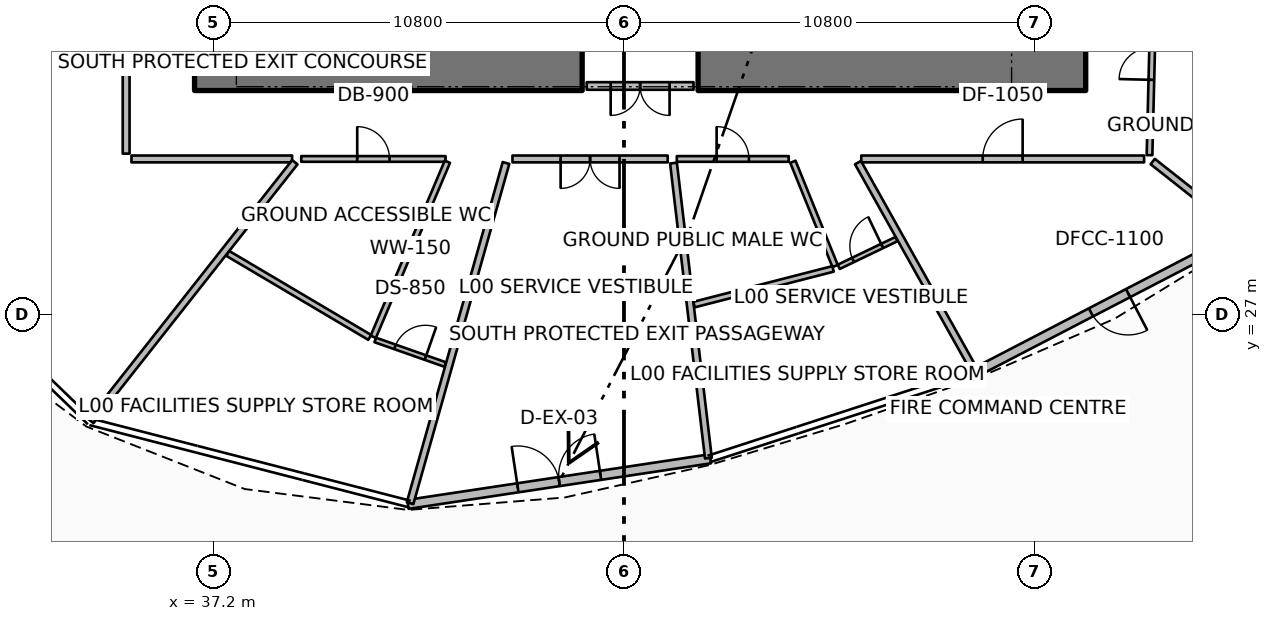
"""IFC4 building model, lengths in metres.
Left out: names, types, materials, properties, quantities, classifications, styles, units other than length and angle.
Written with IfcOpenShell. Run it as: python <this file> out.ifc"""

import sys

from ifc_helpers import new_model, si_unit, direction, frame, frame_2d, origin, place, context, subcontext, project, spatial, rectangle, extrude, element, fill, save


model = new_model("IFC4")
c1 = context("Model", 3, precision=1e-05, world=origin(), true_north=direction((0.0, 1.0)))
c2 = subcontext(c1, "Body", "Model", "MODEL_VIEW")
j1 = project(units=[si_unit("LENGTHUNIT", "METRE"), si_unit("PLANEANGLEUNIT", "RADIAN")], contexts=[c1])
p1 = place(None, origin())
s1 = spatial("IfcSite", under=j1, at=p1, CompositionType="ELEMENT")
p2 = place(p1, origin())
s2 = spatial("IfcBuilding", under=s1, at=p2, CompositionType="ELEMENT")
p3 = place(p2, origin())
s3 = spatial("IfcBuildingStorey", under=s2, at=p3, CompositionType="ELEMENT", Elevation=0.0)
for number, where, z_axis, x_axis in (
    (1, (36.7, 33.45, 0.0), (0.0, 0.0, 1.0), (1.0, 0.0, 0.0)),
    (2, (49.95, 33.45, 0.0), (0.0, 0.0, 1.0), (1.0, 0.0, 0.0)),
):
    element("IfcWall", number, at=place(p3, frame(where, z_axis=z_axis, x_axis=x_axis)), inside=s3, PredefinedType="SHEAR", context=c2, shape_type="SweptSolid", body=[
        extrude(rectangle(XDim=10.2, YDim=1.1, at=frame_2d((5.1, 0.0))), origin(), (0.0, 0.0, 1.0), 7.2),
    ])
p4 = place(p3, frame((50.274, 23.21, 0.0), z_axis=(0.0, 0.0, 1.0), x_axis=(-0.988842711484, -0.148963391291, 0.0)))
e3 = element("IfcWall", 3, at=p4, inside=s3, PredefinedType="SOLIDWALL", context=c2, shape_type="SweptSolid", body=[
    extrude(rectangle(XDim=8.049, YDim=0.24, at=frame_2d((4.024, 0.0))), origin(), (0.0, 0.0, 1.0), 5.35),
])
p5 = place(p4, frame((2.924, 0.0, 0.0)))
e4 = element("IfcOpeningElement", 4, at=p5, cuts=e3, PredefinedType="OPENING", context=c2, shape_type="SweptSolid", body=[
    extrude(rectangle(XDim=2.2, YDim=2.4, at=frame_2d((1.1, 1.2))), frame((0.0, 0.13, 0.0), z_axis=(0.0, -1.0, 0.0), x_axis=(1.0, 0.0, 0.0)), (0.0, 0.0, 1.0), 0.26),
])
p6 = place(p3, frame((64.348, 29.17, 0.0), z_axis=(0.0, 0.0, 1.0), x_axis=(-0.887579557391, -0.460654457594, 0.0)))
e5 = element("IfcWall", 5, at=p6, inside=s3, PredefinedType="SOLIDWALL", context=c2, shape_type="SweptSolid", body=[
    extrude(rectangle(XDim=8.049, YDim=0.24, at=frame_2d((4.024, 0.0))), origin(), (0.0, 0.0, 1.0), 5.35),
])
p7 = place(p6, frame((3.474, 0.0, 0.0)))
e6 = element("IfcOpeningElement", 6, at=p7, cuts=e5, PredefinedType="OPENING", context=c2, shape_type="SweptSolid", body=[
    extrude(rectangle(XDim=1.1, YDim=2.2, at=frame_2d((0.55, 1.1))), frame((0.0, 0.13, 0.0), z_axis=(0.0, -1.0, 0.0), x_axis=(1.0, 0.0, 0.0)), (0.0, 0.0, 1.0), 0.26),
])
p8 = place(p3, frame((47.02, 33.02, 0.0), z_axis=(0.0, 0.0, 1.0), x_axis=(1.0, 0.0, 0.0)))
e7 = element("IfcWall", 7, at=p8, inside=s3, PredefinedType="PARTITIONING", context=c2, shape_type="SweptSolid", body=[
    extrude(rectangle(XDim=2.81, YDim=0.2, at=frame_2d((1.405, 0.0))), origin(), (0.0, 0.0, 1.0), 6.8),
])
p9 = place(p8, frame((0.63, 0.0, 0.0)))
e8 = element("IfcOpeningElement", 8, at=p9, cuts=e7, PredefinedType="OPENING", context=c2, shape_type="SweptSolid", body=[
    extrude(rectangle(XDim=1.55, YDim=2.15, at=frame_2d((0.775, 1.075))), frame((0.0, 0.11, 0.0), z_axis=(0.0, -1.0, 0.0), x_axis=(1.0, 0.0, 0.0)), (0.0, 0.0, 1.0), 0.22),
])
p10 = place(p3, frame((34.9, 34.524, 0.0), z_axis=(0.0, 0.0, 1.0), x_axis=(0.0, -1.0, 0.0)))
e9 = element("IfcWall", 9, at=p10, inside=s3, PredefinedType="PARTITIONING", context=c2, shape_type="SweptSolid", body=[
    extrude(rectangle(XDim=3.284, YDim=0.18, at=frame_2d((1.642, 0.0))), origin(), (0.0, 0.0, 1.0), 5.375),
])
p11 = place(p3, frame((35.04, 31.1, 0.0), z_axis=(0.0, 0.0, 1.0), x_axis=(1.0, 0.0, 0.0)))
e10 = element("IfcWall", 10, at=p11, inside=s3, PredefinedType="PARTITIONING", context=c2, shape_type="SweptSolid", body=[
    extrude(rectangle(XDim=4.227, YDim=0.18, at=frame_2d((2.114, 0.0))), origin(), (0.0, 0.0, 1.0), 5.375),
])
p12 = place(p3, frame((39.339, 31.014, 0.0), z_axis=(0.0, 0.0, 1.0), x_axis=(-0.619079077481, -0.785328654657, 0.0)))
e11 = element("IfcWall", 11, at=p12, inside=s3, PredefinedType="PARTITIONING", context=c2, shape_type="SweptSolid", body=[
    extrude(rectangle(XDim=8.672, YDim=0.18, at=frame_2d((4.336, 0.0))), origin(), (0.0, 0.0, 1.0), 5.375),
])
p13 = place(p3, frame((39.507, 31.1, 0.0), z_axis=(0.0, 0.0, 1.0), x_axis=(1.0, 0.0, 0.0)))
e12 = element("IfcWall", 12, at=p13, inside=s3, PredefinedType="PARTITIONING", context=c2, shape_type="SweptSolid", body=[
    extrude(rectangle(XDim=3.797, YDim=0.15, at=frame_2d((1.899, 0.0))), origin(), (0.0, 0.0, 1.0), 5.375),
])
p14 = place(p13, frame((1.474, 0.0, 0.0)))
e13 = element("IfcOpeningElement", 13, at=p14, cuts=e12, PredefinedType="OPENING", context=c2, shape_type="SweptSolid", body=[
    extrude(rectangle(XDim=0.85, YDim=2.06, at=frame_2d((0.425, 1.03))), frame((0.0, 0.085, 0.0), z_axis=(0.0, -1.0, 0.0), x_axis=(1.0, 0.0, 0.0)), (0.0, 0.0, 1.0), 0.17),
])
p15 = place(p3, frame((43.353, 31.026, 0.0), z_axis=(0.0, 0.0, 1.0), x_axis=(-0.389934465456, -0.92084261014, 0.0)))
e14 = element("IfcWall", 14, at=p15, inside=s3, PredefinedType="PARTITIONING", context=c2, shape_type="SweptSolid", body=[
    extrude(rectangle(XDim=5.003, YDim=0.15, at=frame_2d((2.501, 0.0))), origin(), (0.0, 0.0, 1.0), 6.24),
])
p16 = place(p3, frame((37.574, 28.615, 0.0), z_axis=(0.0, 0.0, 1.0), x_axis=(0.860721546392, -0.509076044984, 0.0)))
e15 = element("IfcWall", 15, at=p16, inside=s3, PredefinedType="PARTITIONING", context=c2, shape_type="SweptSolid", body=[
    extrude(rectangle(XDim=4.341, YDim=0.15, at=frame_2d((2.17, 0.0))), origin(), (0.0, 0.0, 1.0), 5.375),
])
p17 = place(p3, frame((41.455, 26.337, 0.0), z_axis=(0.0, 0.0, 1.0), x_axis=(0.943522494941, -0.331308468863, 0.0)))
e16 = element("IfcWall", 16, at=p17, inside=s3, PredefinedType="PARTITIONING", context=c2, shape_type="SweptSolid", body=[
    extrude(rectangle(XDim=1.952, YDim=0.125, at=frame_2d((0.976, 0.0))), origin(), (0.0, 0.0, 1.0), 5.375),
])
p18 = place(p17, frame((0.551, 0.0, 0.0)))
e17 = element("IfcOpeningElement", 17, at=p18, cuts=e16, PredefinedType="OPENING", context=c2, shape_type="SweptSolid", body=[
    extrude(rectangle(XDim=0.85, YDim=2.06, at=frame_2d((0.425, 1.03))), frame((0.0, 0.073, 0.0), z_axis=(0.0, -1.0, 0.0), x_axis=(1.0, 0.0, 0.0)), (0.0, 0.0, 1.0), 0.145),
])
p19 = place(p3, frame((44.896, 30.994, 0.0), z_axis=(0.0, 0.0, 1.0), x_axis=(-0.271432731122, -0.962457413331, 0.0)))
e18 = element("IfcWall", 18, at=p19, inside=s3, PredefinedType="PARTITIONING", context=c2, shape_type="SweptSolid", body=[
    extrude(rectangle(XDim=9.3, YDim=0.18, at=frame_2d((4.65, 0.0))), origin(), (0.0, 0.0, 1.0), 5.375),
])
p20 = place(p3, frame((45.066, 31.1, 0.0), z_axis=(0.0, 0.0, 1.0), x_axis=(1.0, 0.0, 0.0)))
e19 = element("IfcWall", 19, at=p20, inside=s3, PredefinedType="PARTITIONING", context=c2, shape_type="SweptSolid", body=[
    extrude(rectangle(XDim=4.084, YDim=0.18, at=frame_2d((2.042, 0.0))), origin(), (0.0, 0.0, 1.0), 5.375),
])
p21 = place(p20, frame((1.267, 0.0, 0.0)))
e20 = element("IfcOpeningElement", 20, at=p21, cuts=e19, PredefinedType="OPENING", context=c2, shape_type="SweptSolid", body=[
    extrude(rectangle(XDim=1.55, YDim=2.15, at=frame_2d((0.775, 1.075))), frame((0.0, 0.1, 0.0), z_axis=(0.0, -1.0, 0.0), x_axis=(1.0, 0.0, 0.0)), (0.0, 0.0, 1.0), 0.2),
])
p22 = place(p3, frame((49.303, 30.991, 0.0), z_axis=(0.0, 0.0, 1.0), x_axis=(0.117524370387, -0.993069998724, 0.0)))
e21 = element("IfcWall", 21, at=p22, inside=s3, PredefinedType="PARTITIONING", context=c2, shape_type="SweptSolid", body=[
    extrude(rectangle(XDim=7.817, YDim=0.18, at=frame_2d((3.909, 0.0))), origin(), (0.0, 0.0, 1.0), 6.24),
])
p23 = place(p3, frame((49.39, 31.1, 0.0), z_axis=(0.0, 0.0, 1.0), x_axis=(1.0, 0.0, 0.0)))
e22 = element("IfcWall", 22, at=p23, inside=s3, PredefinedType="PARTITIONING", context=c2, shape_type="SweptSolid", body=[
    extrude(rectangle(XDim=2.945, YDim=0.15, at=frame_2d((1.472, 0.0))), origin(), (0.0, 0.0, 1.0), 5.757),
])
p24 = place(p23, frame((1.048, 0.0, 0.0)))
e23 = element("IfcOpeningElement", 23, at=p24, cuts=e22, PredefinedType="OPENING", context=c2, shape_type="SweptSolid", body=[
    extrude(rectangle(XDim=0.85, YDim=2.06, at=frame_2d((0.425, 1.03))), frame((0.0, 0.085, 0.0), z_axis=(0.0, -1.0, 0.0), x_axis=(1.0, 0.0, 0.0)), (0.0, 0.0, 1.0), 0.17),
])
p25 = place(p3, frame((52.445, 31.026, 0.0), z_axis=(0.0, 0.0, 1.0), x_axis=(0.375383430631, -0.926869613272, 0.0)))
e24 = element("IfcWall", 24, at=p25, inside=s3, PredefinedType="PARTITIONING", context=c2, shape_type="SweptSolid", body=[
    extrude(rectangle(XDim=2.96, YDim=0.15, at=frame_2d((1.48, 0.0))), origin(), (0.0, 0.0, 1.0), 6.24),
])
p26 = place(p3, frame((49.844, 27.268, 0.0), z_axis=(0.0, 0.0, 1.0), x_axis=(0.968578859701, 0.248706639519, 0.0)))
e25 = element("IfcWall", 25, at=p26, inside=s3, PredefinedType="PARTITIONING", context=c2, shape_type="SweptSolid", body=[
    extrude(rectangle(XDim=3.776, YDim=0.15, at=frame_2d((1.888, 0.0))), origin(), (0.0, 0.0, 1.0), 5.757),
])
p27 = place(p3, frame((53.651, 28.261, 0.0), z_axis=(0.0, 0.0, 1.0), x_axis=(0.90143718487, 0.432909923348, 0.0)))
e26 = element("IfcWall", 26, at=p27, inside=s3, PredefinedType="PARTITIONING", context=c2, shape_type="SweptSolid", body=[
    extrude(rectangle(XDim=1.686, YDim=0.125, at=frame_2d((0.843, 0.0))), origin(), (0.0, 0.0, 1.0), 5.757),
])
p28 = place(p27, frame((0.418, 0.0, 0.0)))
e27 = element("IfcOpeningElement", 27, at=p28, cuts=e26, PredefinedType="OPENING", context=c2, shape_type="SweptSolid", body=[
    extrude(rectangle(XDim=0.85, YDim=2.06, at=frame_2d((0.425, 1.03))), frame((0.0, 0.073, 0.0), z_axis=(0.0, -1.0, 0.0), x_axis=(1.0, 0.0, 0.0)), (0.0, 0.0, 1.0), 0.145),
])
p29 = place(p3, frame((54.158, 31.004, 0.0), z_axis=(0.0, 0.0, 1.0), x_axis=(0.488621069092, -0.872496103624, 0.0)))
e28 = element("IfcWall", 28, at=p29, inside=s3, PredefinedType="PARTITIONING", context=c2, shape_type="SweptSolid", body=[
    extrude(rectangle(XDim=6.3, YDim=0.18, at=frame_2d((3.15, 0.0))), origin(), (0.0, 0.0, 1.0), 5.757),
])
p30 = place(p3, frame((54.244, 31.1, 0.0), z_axis=(0.0, 0.0, 1.0), x_axis=(1.0, 0.0, 0.0)))
e29 = element("IfcWall", 29, at=p30, inside=s3, PredefinedType="PARTITIONING", context=c2, shape_type="SweptSolid", body=[
    extrude(rectangle(XDim=7.442, YDim=0.18, at=frame_2d((3.721, 0.0))), origin(), (0.0, 0.0, 1.0), 5.757),
])
p31 = place(p30, frame((3.196, 0.0, 0.0)))
e30 = element("IfcOpeningElement", 30, at=p31, cuts=e29, PredefinedType="OPENING", context=c2, shape_type="SweptSolid", body=[
    extrude(rectangle(XDim=1.05, YDim=2.1, at=frame_2d((0.525, 1.05))), frame((0.0, 0.1, 0.0), z_axis=(0.0, -1.0, 0.0), x_axis=(1.0, 0.0, 0.0)), (0.0, 0.0, 1.0), 0.2),
])
p32 = place(p3, frame((61.913, 31.032, 0.0), z_axis=(0.0, 0.0, 1.0), x_axis=(0.785290333853, -0.619127685988, 0.0)))
e31 = element("IfcWall", 31, at=p32, inside=s3, PredefinedType="PARTITIONING", context=c2, shape_type="SweptSolid", body=[
    extrude(rectangle(XDim=3.019, YDim=0.18, at=frame_2d((1.51, 0.0))), origin(), (0.0, 0.0, 1.0), 5.757),
])
p33 = place(p3, frame((61.829, 31.2, 0.0), z_axis=(0.0, 0.0, 1.0), x_axis=(0.024695722425, 0.999695014139, 0.0)))
e32 = element("IfcWall", 32, at=p33, inside=s3, PredefinedType="PARTITIONING", context=c2, shape_type="SweptSolid", body=[
    extrude(rectangle(XDim=4.814, YDim=0.15, at=frame_2d((2.407, 0.0))), origin(), (0.0, 0.0, 1.0), 5.757),
])
p34 = place(p33, frame((1.982, 0.0, 0.0)))
e33 = element("IfcOpeningElement", 33, at=p34, cuts=e32, PredefinedType="OPENING", context=c2, shape_type="SweptSolid", body=[
    extrude(rectangle(XDim=0.85, YDim=2.06, at=frame_2d((0.425, 1.03))), frame((0.0, 0.085, 0.0), z_axis=(0.0, -1.0, 0.0), x_axis=(1.0, 0.0, 0.0)), (0.0, 0.0, 1.0), 0.17),
])
p35 = place(p3, frame((62.024, 36.062, 0.0), z_axis=(0.0, 0.0, 1.0), x_axis=(0.920852129173, -0.389911985193, 0.0)))
e34 = element("IfcWall", 34, at=p35, inside=s3, PredefinedType="PARTITIONING", context=c2, shape_type="SweptSolid", body=[
    extrude(rectangle(XDim=5.417, YDim=0.15, at=frame_2d((2.708, 0.0))), origin(), (0.0, 0.0, 1.0), 6.24),
])
p36 = place(p5, origin())
e35 = element("IfcDoor", 35, at=p36, inside=s3, OperationType="DOUBLE_DOOR_SINGLE_SWING", PredefinedType="DOOR", context=c2, shape_type="SweptSolid", body=[
    extrude(rectangle(XDim=2.2, YDim=2.4, at=frame_2d((1.1, 1.2))), frame((0.0, 0.025, 0.0), z_axis=(0.0, -1.0, 0.0), x_axis=(1.0, 0.0, 0.0)), (0.0, 0.0, 1.0), 0.05),
])
fill(e4, e35)
p37 = place(p7, origin())
e36 = element("IfcDoor", 36, at=p37, inside=s3, OperationType="SINGLE_SWING_LEFT", PredefinedType="DOOR", context=c2, shape_type="SweptSolid", body=[
    extrude(rectangle(XDim=1.1, YDim=2.2, at=frame_2d((0.55, 1.1))), frame((0.0, 0.025, 0.0), z_axis=(0.0, -1.0, 0.0), x_axis=(1.0, 0.0, 0.0)), (0.0, 0.0, 1.0), 0.05),
])
fill(e6, e36)
p38 = place(p9, origin())
e37 = element("IfcDoor", 37, at=p38, inside=s3, OperationType="DOUBLE_DOOR_SINGLE_SWING", PredefinedType="DOOR", context=c2, shape_type="SweptSolid", body=[
    extrude(rectangle(XDim=1.55, YDim=2.15, at=frame_2d((0.775, 1.075))), frame((0.0, 0.025, 0.0), z_axis=(0.0, -1.0, 0.0), x_axis=(1.0, 0.0, 0.0)), (0.0, 0.0, 1.0), 0.05),
])
fill(e8, e37)
p39 = place(p14, origin())
e38 = element("IfcDoor", 38, at=p39, inside=s3, OperationType="SINGLE_SWING_LEFT", PredefinedType="DOOR", context=c2, shape_type="SweptSolid", body=[
    extrude(rectangle(XDim=0.85, YDim=2.06, at=frame_2d((0.425, 1.03))), frame((0.0, 0.025, 0.0), z_axis=(0.0, -1.0, 0.0), x_axis=(1.0, 0.0, 0.0)), (0.0, 0.0, 1.0), 0.05),
])
fill(e13, e38)
p40 = place(p18, origin())
e39 = element("IfcDoor", 39, at=p40, inside=s3, OperationType="SINGLE_SWING_RIGHT", PredefinedType="DOOR", context=c2, shape_type="SweptSolid", body=[
    extrude(rectangle(XDim=0.85, YDim=2.06, at=frame_2d((0.425, 1.03))), frame((0.0, 0.025, 0.0), z_axis=(0.0, -1.0, 0.0), x_axis=(1.0, 0.0, 0.0)), (0.0, 0.0, 1.0), 0.05),
])
fill(e17, e39)
p41 = place(p21, origin())
e40 = element("IfcDoor", 40, at=p41, inside=s3, OperationType="DOUBLE_DOOR_SINGLE_SWING", PredefinedType="DOOR", context=c2, shape_type="SweptSolid", body=[
    extrude(rectangle(XDim=1.55, YDim=2.15, at=frame_2d((0.775, 1.075))), frame((0.0, 0.025, 0.0), z_axis=(0.0, -1.0, 0.0), x_axis=(1.0, 0.0, 0.0)), (0.0, 0.0, 1.0), 0.05),
])
fill(e20, e40)
p42 = place(p24, origin())
e41 = element("IfcDoor", 41, at=p42, inside=s3, OperationType="SINGLE_SWING_LEFT", PredefinedType="DOOR", context=c2, shape_type="SweptSolid", body=[
    extrude(rectangle(XDim=0.85, YDim=2.06, at=frame_2d((0.425, 1.03))), frame((0.0, 0.025, 0.0), z_axis=(0.0, -1.0, 0.0), x_axis=(1.0, 0.0, 0.0)), (0.0, 0.0, 1.0), 0.05),
])
fill(e23, e41)
p43 = place(p28, origin())
e42 = element("IfcDoor", 42, at=p43, inside=s3, OperationType="SINGLE_SWING_RIGHT", PredefinedType="DOOR", context=c2, shape_type="SweptSolid", body=[
    extrude(rectangle(XDim=0.85, YDim=2.06, at=frame_2d((0.425, 1.03))), frame((0.0, 0.025, 0.0), z_axis=(0.0, -1.0, 0.0), x_axis=(1.0, 0.0, 0.0)), (0.0, 0.0, 1.0), 0.05),
])
fill(e27, e42)
p44 = place(p31, origin())
e43 = element("IfcDoor", 43, at=p44, inside=s3, OperationType="SINGLE_SWING_RIGHT", PredefinedType="DOOR", context=c2, shape_type="SweptSolid", body=[
    extrude(rectangle(XDim=1.05, YDim=2.1, at=frame_2d((0.525, 1.05))), frame((0.0, 0.025, 0.0), z_axis=(0.0, -1.0, 0.0), x_axis=(1.0, 0.0, 0.0)), (0.0, 0.0, 1.0), 0.05),
])
fill(e30, e43)
p45 = place(p34, origin())
e44 = element("IfcDoor", 44, at=p45, inside=s3, OperationType="SINGLE_SWING_LEFT", PredefinedType="DOOR", context=c2, shape_type="SweptSolid", body=[
    extrude(rectangle(XDim=0.85, YDim=2.06, at=frame_2d((0.425, 1.03))), frame((0.0, 0.025, 0.0), z_axis=(0.0, -1.0, 0.0), x_axis=(1.0, 0.0, 0.0)), (0.0, 0.0, 1.0), 0.05),
])
fill(e33, e44)
save(model, sys.argv[1])
